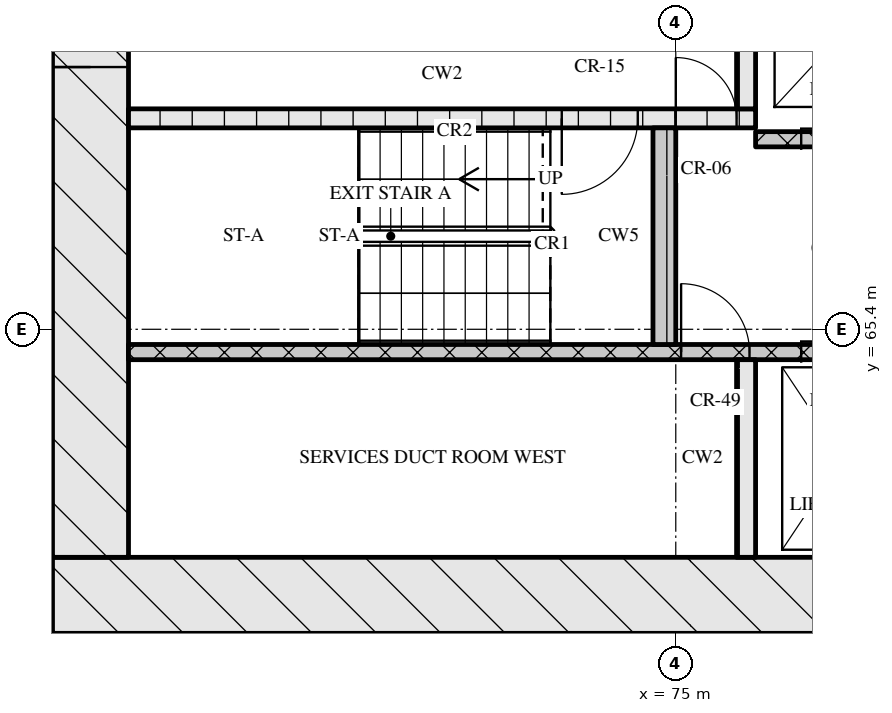
"""IFC4 building model, lengths in metres.
Left out: names, types, materials, properties, quantities, classifications, styles, units other than length and angle.
Written with IfcOpenShell. Run it as: python <this file> out.ifc"""

import sys

from ifc_helpers import new_model, si_unit, direction, frame, frame_2d, origin, place, context, subcontext, project, spatial, rectangle, extrude, element, fill, save


model = new_model("IFC4")
c1 = context("Model", 3, precision=1e-05, world=origin(), true_north=direction((0.0, 1.0)))
c2 = subcontext(c1, "Body", "Model", "MODEL_VIEW")
j1 = project(units=[si_unit("LENGTHUNIT", "METRE"), si_unit("PLANEANGLEUNIT", "RADIAN")], contexts=[c1])
p1 = place(None, origin())
s1 = spatial("IfcSite", under=j1, at=p1, CompositionType="ELEMENT")
p2 = place(p1, origin())
s2 = spatial("IfcBuilding", under=s1, at=p2, CompositionType="ELEMENT")
p3 = place(p2, frame((0.0, 0.0, 113.25)))
s3 = spatial("IfcBuildingStorey", under=s2, at=p3, CompositionType="ELEMENT", Elevation=113.25)
p4 = place(p3, frame((66.8, 61.9, 0.0), z_axis=(0.0, 0.0, 1.0), x_axis=(1.0, 0.0, 0.0)))
e1 = element("IfcWall", 1, at=p4, inside=s3, PredefinedType="SOLIDWALL", context=c2, shape_type="SweptSolid", body=[
    extrude(rectangle(XDim=41.6, YDim=1.0, at=frame_2d((20.8, 0.0))), origin(), (0.0, 0.0, 1.0), 3.32),
])
p5 = place(p4, frame((21.15, 0.0, 0.0)))
e2 = element("IfcOpeningElement", 2, at=p5, cuts=e1, PredefinedType="OPENING", context=c2, shape_type="SweptSolid", body=[
    extrude(rectangle(XDim=1.8, YDim=2.1, at=frame_2d((0.9, 1.05))), frame((0.0, 0.51, 0.0), z_axis=(0.0, -1.0, 0.0), x_axis=(1.0, 0.0, 0.0)), (0.0, 0.0, 1.0), 1.02),
])
p6 = place(p3, frame((67.3, 62.4, 0.0), z_axis=(0.0, 0.0, 1.0), x_axis=(0.0, 1.0, 0.0)))
e3 = element("IfcWall", 3, at=p6, inside=s3, PredefinedType="SOLIDWALL", context=c2, shape_type="SweptSolid", body=[
    extrude(rectangle(XDim=12.0, YDim=1.0, at=frame_2d((6.0, 0.0))), origin(), (0.0, 0.0, 1.0), 3.32),
])
p7 = place(p6, frame((6.45, 0.0, 0.0)))
e4 = element("IfcOpeningElement", 4, at=p7, cuts=e3, PredefinedType="OPENING", context=c2, shape_type="SweptSolid", body=[
    extrude(rectangle(XDim=1.2, YDim=2.1, at=frame_2d((0.6, 1.05))), frame((0.0, 0.51, 0.0), z_axis=(0.0, -1.0, 0.0), x_axis=(1.0, 0.0, 0.0)), (0.0, 0.0, 1.0), 1.02),
])
p8 = place(p3, frame((75.925, 62.4, 0.0), z_axis=(0.0, 0.0, 1.0), x_axis=(0.0, 1.0, 0.0)))
e5 = element("IfcWall", 5, at=p8, inside=s3, PredefinedType="SOLIDWALL", context=c2, shape_type="SweptSolid", body=[
    extrude(rectangle(XDim=2.6, YDim=0.25, at=frame_2d((1.3, 0.0))), origin(), (0.0, 0.0, 1.0), 3.32),
])
p9 = place(p3, frame((67.8, 65.1, 0.0), z_axis=(0.0, 0.0, 1.0), x_axis=(1.0, 0.0, 0.0)))
e6 = element("IfcWall", 6, at=p9, inside=s3, PredefinedType="SOLIDWALL", context=c2, shape_type="SweptSolid", body=[
    extrude(rectangle(XDim=18.5, YDim=0.2, at=frame_2d((9.25, 0.0))), origin(), (0.0, 0.0, 1.0), 3.32),
])
p10 = place(p9, frame((7.27, 0.0, 0.0)))
e7 = element("IfcOpeningElement", 7, at=p10, cuts=e6, PredefinedType="OPENING", context=c2, shape_type="SweptSolid", body=[
    extrude(rectangle(XDim=0.9, YDim=2.1, at=frame_2d((0.45, 1.05))), frame((0.0, 0.11, 0.0), z_axis=(0.0, -1.0, 0.0), x_axis=(1.0, 0.0, 0.0)), (0.0, 0.0, 1.0), 0.22),
])
p11 = place(p9, frame((8.85, 0.0, 0.0)))
e8 = element("IfcOpeningElement", 8, at=p11, cuts=e6, PredefinedType="OPENING", context=c2, shape_type="SweptSolid", body=[
    extrude(rectangle(XDim=1.1, YDim=2.1, at=frame_2d((0.55, 1.05))), frame((0.0, 0.11, 0.0), z_axis=(0.0, -1.0, 0.0), x_axis=(1.0, 0.0, 0.0)), (0.0, 0.0, 1.0), 0.22),
])
p12 = place(p9, frame((11.35, 0.0, 0.0)))
e9 = element("IfcOpeningElement", 9, at=p12, cuts=e6, PredefinedType="OPENING", context=c2, shape_type="SweptSolid", body=[
    extrude(rectangle(XDim=1.1, YDim=2.1, at=frame_2d((0.55, 1.05))), frame((0.0, 0.11, 0.0), z_axis=(0.0, -1.0, 0.0), x_axis=(1.0, 0.0, 0.0)), (0.0, 0.0, 1.0), 0.22),
])
p13 = place(p9, frame((13.85, 0.0, 0.0)))
e10 = element("IfcOpeningElement", 10, at=p13, cuts=e6, PredefinedType="OPENING", context=c2, shape_type="SweptSolid", body=[
    extrude(rectangle(XDim=1.1, YDim=2.1, at=frame_2d((0.55, 1.05))), frame((0.0, 0.11, 0.0), z_axis=(0.0, -1.0, 0.0), x_axis=(1.0, 0.0, 0.0)), (0.0, 0.0, 1.0), 0.22),
])
p14 = place(p9, frame((16.7, 0.0, 0.0)))
e11 = element("IfcOpeningElement", 11, at=p14, cuts=e6, PredefinedType="OPENING", context=c2, shape_type="SweptSolid", body=[
    extrude(rectangle(XDim=0.9, YDim=2.1, at=frame_2d((0.45, 1.05))), frame((0.0, 0.11, 0.0), z_axis=(0.0, -1.0, 0.0), x_axis=(1.0, 0.0, 0.0)), (0.0, 0.0, 1.0), 0.22),
])
p15 = place(p3, frame((74.85, 65.2, 0.0), z_axis=(0.0, 0.0, 1.0), x_axis=(0.0, 1.0, 0.0)))
e12 = element("IfcWall", 12, at=p15, inside=s3, PredefinedType="SOLIDWALL", context=c2, shape_type="SweptSolid", body=[
    extrude(rectangle(XDim=2.85, YDim=0.3, at=frame_2d((1.425, 0.0))), origin(), (0.0, 0.0, 1.0), 3.32),
])
p16 = place(p3, frame((76.05, 67.9, 0.0), z_axis=(0.0, 0.0, 1.0), x_axis=(1.0, 0.0, 0.0)))
e13 = element("IfcWall", 13, at=p16, inside=s3, PredefinedType="SOLIDWALL", context=c2, shape_type="SweptSolid", body=[
    extrude(rectangle(XDim=23.1, YDim=0.2, at=frame_2d((11.55, 0.0))), origin(), (0.0, 0.0, 1.0), 3.32),
])
p17 = place(p16, frame((0.6, 0.0, 0.0)))
e14 = element("IfcOpeningElement", 14, at=p17, cuts=e13, PredefinedType="OPENING", context=c2, shape_type="SweptSolid", body=[
    extrude(rectangle(XDim=1.1, YDim=2.1, at=frame_2d((0.55, 1.05))), frame((0.0, 0.11, 0.0), z_axis=(0.0, -1.0, 0.0), x_axis=(1.0, 0.0, 0.0)), (0.0, 0.0, 1.0), 0.22),
])
p18 = place(p16, frame((3.1, 0.0, 0.0)))
e15 = element("IfcOpeningElement", 15, at=p18, cuts=e13, PredefinedType="OPENING", context=c2, shape_type="SweptSolid", body=[
    extrude(rectangle(XDim=1.1, YDim=2.1, at=frame_2d((0.55, 1.05))), frame((0.0, 0.11, 0.0), z_axis=(0.0, -1.0, 0.0), x_axis=(1.0, 0.0, 0.0)), (0.0, 0.0, 1.0), 0.22),
])
p19 = place(p16, frame((5.6, 0.0, 0.0)))
e16 = element("IfcOpeningElement", 16, at=p19, cuts=e13, PredefinedType="OPENING", context=c2, shape_type="SweptSolid", body=[
    extrude(rectangle(XDim=1.1, YDim=2.1, at=frame_2d((0.55, 1.05))), frame((0.0, 0.11, 0.0), z_axis=(0.0, -1.0, 0.0), x_axis=(1.0, 0.0, 0.0)), (0.0, 0.0, 1.0), 0.22),
])
p20 = place(p16, frame((9.7, 0.0, 0.0)))
e17 = element("IfcOpeningElement", 17, at=p20, cuts=e13, PredefinedType="OPENING", context=c2, shape_type="SweptSolid", body=[
    extrude(rectangle(XDim=0.9, YDim=2.1, at=frame_2d((0.45, 1.05))), frame((0.0, 0.11, 0.0), z_axis=(0.0, -1.0, 0.0), x_axis=(1.0, 0.0, 0.0)), (0.0, 0.0, 1.0), 0.22),
])
p21 = place(p16, frame((13.55, 0.0, 0.0)))
e18 = element("IfcOpeningElement", 18, at=p21, cuts=e13, PredefinedType="OPENING", context=c2, shape_type="SweptSolid", body=[
    extrude(rectangle(XDim=1.0, YDim=2.1, at=frame_2d((0.5, 1.05))), frame((0.0, 0.11, 0.0), z_axis=(0.0, -1.0, 0.0), x_axis=(1.0, 0.0, 0.0)), (0.0, 0.0, 1.0), 0.22),
])
p22 = place(p3, frame((67.8, 68.175, 0.0), z_axis=(0.0, 0.0, 1.0), x_axis=(1.0, 0.0, 0.0)))
e19 = element("IfcWall", 19, at=p22, inside=s3, PredefinedType="SOLIDWALL", context=c2, shape_type="SweptSolid", body=[
    extrude(rectangle(XDim=8.25, YDim=0.25, at=frame_2d((4.125, 0.0))), origin(), (0.0, 0.0, 1.0), 3.32),
])
p23 = place(p22, frame((5.7, 0.0, 0.0)))
e20 = element("IfcOpeningElement", 20, at=p23, cuts=e19, PredefinedType="OPENING", context=c2, shape_type="SweptSolid", body=[
    extrude(rectangle(XDim=1.0, YDim=2.1, at=frame_2d((0.5, 1.05))), frame((0.0, 0.135, 0.0), z_axis=(0.0, -1.0, 0.0), x_axis=(1.0, 0.0, 0.0)), (0.0, 0.0, 1.0), 0.27),
])
p24 = place(p22, frame((7.2, 0.0, 0.0)))
e21 = element("IfcOpeningElement", 21, at=p24, cuts=e19, PredefinedType="OPENING", context=c2, shape_type="SweptSolid", body=[
    extrude(rectangle(XDim=0.8, YDim=2.1, at=frame_2d((0.4, 1.05))), frame((0.0, 0.135, 0.0), z_axis=(0.0, -1.0, 0.0), x_axis=(1.0, 0.0, 0.0)), (0.0, 0.0, 1.0), 0.27),
])
p25 = place(p3, frame((75.925, 68.3, 0.0), z_axis=(0.0, 0.0, 1.0), x_axis=(0.0, 1.0, 0.0)))
e22 = element("IfcWall", 22, at=p25, inside=s3, PredefinedType="SOLIDWALL", context=c2, shape_type="SweptSolid", body=[
    extrude(rectangle(XDim=2.3, YDim=0.25, at=frame_2d((1.15, 0.0))), origin(), (0.0, 0.0, 1.0), 3.32),
])
p26 = place(p10, origin())
e23 = element("IfcDoor", 23, at=p26, inside=s3, OperationType="SINGLE_SWING_LEFT", PredefinedType="DOOR", context=c2, shape_type="SweptSolid", body=[
    extrude(rectangle(XDim=0.9, YDim=2.1, at=frame_2d((0.45, 1.05))), frame((0.0, 0.025, 0.0), z_axis=(0.0, -1.0, 0.0), x_axis=(1.0, 0.0, 0.0)), (0.0, 0.0, 1.0), 0.05),
])
fill(e7, e23)
p27 = place(p11, origin())
e24 = element("IfcDoor", 24, at=p27, inside=s3, OperationType="SLIDING_TO_LEFT", PredefinedType="DOOR", context=c2, shape_type="SweptSolid", body=[
    extrude(rectangle(XDim=1.1, YDim=2.1, at=frame_2d((0.55, 1.05))), frame((0.0, 0.025, 0.0), z_axis=(0.0, -1.0, 0.0), x_axis=(1.0, 0.0, 0.0)), (0.0, 0.0, 1.0), 0.05),
])
fill(e8, e24)
p28 = place(p17, origin())
e25 = element("IfcDoor", 25, at=p28, inside=s3, OperationType="SLIDING_TO_RIGHT", PredefinedType="DOOR", context=c2, shape_type="SweptSolid", body=[
    extrude(rectangle(XDim=1.1, YDim=2.1, at=frame_2d((0.55, 1.05))), frame((0.0, 0.025, 0.0), z_axis=(0.0, -1.0, 0.0), x_axis=(1.0, 0.0, 0.0)), (0.0, 0.0, 1.0), 0.05),
])
fill(e14, e25)
p29 = place(p23, origin())
e26 = element("IfcDoor", 26, at=p29, inside=s3, OperationType="SINGLE_SWING_RIGHT", PredefinedType="DOOR", context=c2, shape_type="SweptSolid", body=[
    extrude(rectangle(XDim=1.0, YDim=2.1, at=frame_2d((0.5, 1.05))), frame((0.0, 0.025, 0.0), z_axis=(0.0, -1.0, 0.0), x_axis=(1.0, 0.0, 0.0)), (0.0, 0.0, 1.0), 0.05),
])
fill(e20, e26)
p30 = place(p24, origin())
e27 = element("IfcDoor", 27, at=p30, inside=s3, OperationType="SINGLE_SWING_LEFT", PredefinedType="DOOR", context=c2, shape_type="SweptSolid", body=[
    extrude(rectangle(XDim=0.8, YDim=2.1, at=frame_2d((0.4, 1.05))), frame((0.0, 0.025, 0.0), z_axis=(0.0, -1.0, 0.0), x_axis=(1.0, 0.0, 0.0)), (0.0, 0.0, 1.0), 0.05),
])
fill(e21, e27)
p31 = place(p7, origin())
e28 = element("IfcDoor", 28, at=p31, inside=s3, OperationType="SINGLE_SWING_LEFT", PredefinedType="DOOR", context=c2, shape_type="SweptSolid", body=[
    extrude(rectangle(XDim=1.2, YDim=2.1, at=frame_2d((0.6, 1.05))), frame((0.0, 0.025, 0.0), z_axis=(0.0, -1.0, 0.0), x_axis=(1.0, 0.0, 0.0)), (0.0, 0.0, 1.0), 0.05),
])
fill(e4, e28)
save(model, sys.argv[1])
